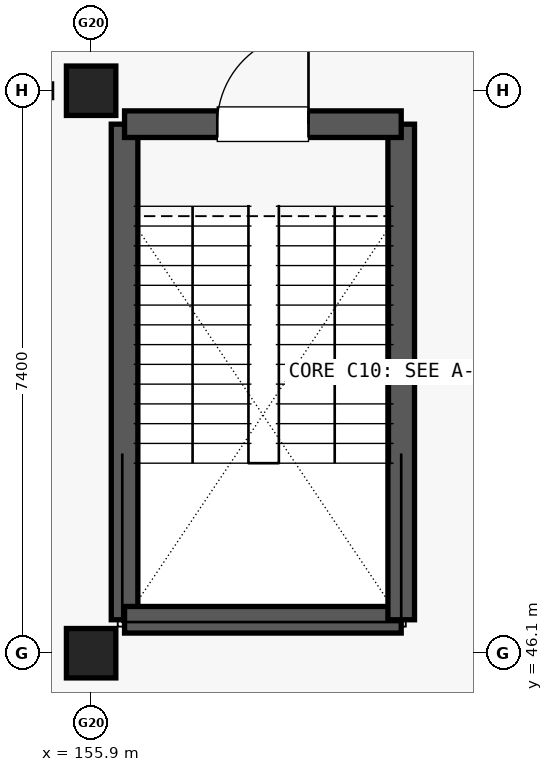
"""IFC4 building model, lengths in metres.
Left out: names, types, materials, properties, quantities, classifications, styles, units other than length and angle.
Written with IfcOpenShell. Run it as: python <this file> out.ifc"""

import sys

from ifc_helpers import new_model, si_unit, direction, frame, frame_2d, origin, origin_2d, place, context, subcontext, project, spatial, rectangle, extrude, element, fill, save


model = new_model("IFC4")
c1 = context("Model", 3, precision=1e-05, world=origin(), true_north=direction((0.0, 1.0)))
c2 = subcontext(c1, "Body", "Model", "MODEL_VIEW")
j1 = project(units=[si_unit("LENGTHUNIT", "METRE"), si_unit("PLANEANGLEUNIT", "RADIAN")], contexts=[c1])
p1 = place(None, origin())
s1 = spatial("IfcSite", under=j1, at=p1, CompositionType="ELEMENT")
p2 = place(p1, origin())
s2 = spatial("IfcBuilding", under=s1, at=p2, CompositionType="ELEMENT")
p3 = place(p2, frame((0.0, 0.0, 5.4)))
s3 = spatial("IfcBuildingStorey", under=s2, at=p3, CompositionType="ELEMENT", Elevation=5.4)
for number, where, z_axis, x_axis in (
    (1, (155.9, 46.1, 0.0), (0.0, 0.0, 1.0), (1.0, 0.0, 0.0)),
    (2, (155.9, 53.5, 0.0), (0.0, 0.0, 1.0), (1.0, 0.0, 0.0)),
):
    element("IfcColumn", number, at=place(p3, frame(where, z_axis=z_axis, x_axis=x_axis)), inside=s3, PredefinedType="COLUMN", context=c2, shape_type="SweptSolid", body=[
        extrude(rectangle(XDim=0.65, YDim=0.65, at=origin_2d()), origin(), (0.0, 0.0, 1.0), 4.56),
    ])
p4 = place(p3, frame((156.34, 46.54, 0.0), z_axis=(0.0, 0.0, 1.0), x_axis=(0.0, 1.0, 0.0)))
e3 = element("IfcWall", 3, at=p4, inside=s3, PredefinedType="SHEAR", context=c2, shape_type="SweptSolid", body=[
    extrude(rectangle(XDim=6.52, YDim=0.35, at=frame_2d((3.26, 0.0))), origin(), (0.0, 0.0, 1.0), 4.555),
])
p5 = place(p3, frame((156.34, 46.54, 0.0), z_axis=(0.0, 0.0, 1.0), x_axis=(1.0, 0.0, 0.0)))
e4 = element("IfcWall", 4, at=p5, inside=s3, PredefinedType="SHEAR", context=c2, shape_type="SweptSolid", body=[
    extrude(rectangle(XDim=3.64, YDim=0.35, at=frame_2d((1.82, 0.0))), origin(), (0.0, 0.0, 1.0), 4.555),
])
p6 = place(p3, frame((159.98, 46.54, 0.0), z_axis=(0.0, 0.0, 1.0), x_axis=(0.0, 1.0, 0.0)))
e5 = element("IfcWall", 5, at=p6, inside=s3, PredefinedType="SHEAR", context=c2, shape_type="SweptSolid", body=[
    extrude(rectangle(XDim=6.52, YDim=0.35, at=frame_2d((3.26, 0.0))), origin(), (0.0, 0.0, 1.0), 4.555),
])
p7 = place(p3, frame((156.34, 53.06, 0.0), z_axis=(0.0, 0.0, 1.0), x_axis=(1.0, 0.0, 0.0)))
e6 = element("IfcWall", 6, at=p7, inside=s3, PredefinedType="SHEAR", context=c2, shape_type="SweptSolid", body=[
    extrude(rectangle(XDim=3.64, YDim=0.35, at=frame_2d((1.82, 0.0))), origin(), (0.0, 0.0, 1.0), 4.555),
])
p8 = place(p7, frame((1.22, 0.0, 0.0)))
e7 = element("IfcOpeningElement", 7, at=p8, cuts=e6, PredefinedType="OPENING", context=c2, shape_type="SweptSolid", body=[
    extrude(rectangle(XDim=1.2, YDim=2.15, at=frame_2d((0.6, 1.075))), frame((0.0, 0.185, 0.0), z_axis=(0.0, -1.0, 0.0), x_axis=(1.0, 0.0, 0.0)), (0.0, 0.0, 1.0), 0.37),
])
p9 = place(p8, origin())
e8 = element("IfcDoor", 8, at=p9, inside=s3, OperationType="SINGLE_SWING_RIGHT", PredefinedType="DOOR", context=c2, shape_type="SweptSolid", body=[
    extrude(rectangle(XDim=1.2, YDim=2.15, at=frame_2d((0.6, 1.075))), frame((0.0, 0.025, 0.0), z_axis=(0.0, -1.0, 0.0), x_axis=(1.0, 0.0, 0.0)), (0.0, 0.0, 1.0), 0.05),
])
fill(e7, e8)
save(model, sys.argv[1])
